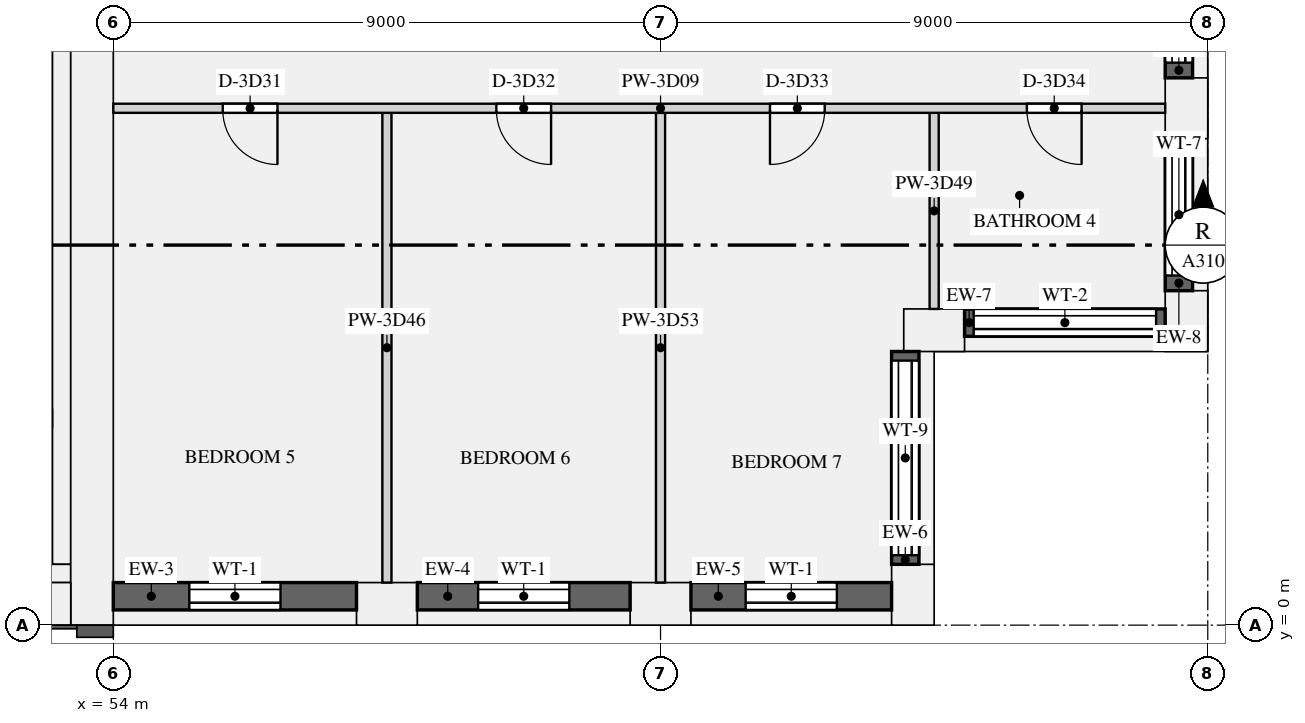
"""IFC4 building model, lengths in metres.
Left out: names, types, materials, properties, quantities, classifications, styles, units other than length and angle.
Written with IfcOpenShell. Run it as: python <this file> out.ifc"""

import sys

from ifc_helpers import new_model, si_unit, direction, frame, frame_2d, origin, origin_2d, place, context, subcontext, project, spatial, rectangle, extrude, element, fill, save


model = new_model("IFC4")
c1 = context("Model", 3, precision=1e-05, world=origin(), true_north=direction((0.0, 1.0)))
c2 = subcontext(c1, "Body", "Model", "MODEL_VIEW")
j1 = project(units=[si_unit("LENGTHUNIT", "METRE"), si_unit("PLANEANGLEUNIT", "RADIAN")], contexts=[c1])
p1 = place(None, origin())
s1 = spatial("IfcSite", under=j1, at=p1, CompositionType="ELEMENT")
p2 = place(p1, origin())
s2 = spatial("IfcBuilding", under=s1, at=p2, CompositionType="ELEMENT")
p3 = place(p2, frame((0.0, 0.0, 166.5)))
s3 = spatial("IfcBuildingStorey", under=s2, at=p3, CompositionType="ELEMENT", Elevation=166.5)
for number, where, z_axis, x_axis in (
    (1, (58.5, 0.35, 0.0), (0.0, 0.0, 1.0), (1.0, 0.0, 0.0)),
    (2, (63.0, 0.35, 0.0), (0.0, 0.0, 1.0), (1.0, 0.0, 0.0)),
    (3, (67.15, 0.5, 0.0), (0.0, 0.0, 1.0), (0.0, 1.0, 0.0)),
    (4, (67.5, 4.85, 0.0), (0.0, 0.0, 1.0), (1.0, 0.0, 0.0)),
    (5, (71.65, 5.0, 0.0), (0.0, 0.0, 1.0), (0.0, 1.0, 0.0)),
    (6, (71.65, 8.5, 0.0), (0.0, 0.0, 1.0), (0.0, 1.0, 0.0)),
):
    element("IfcColumn", number, at=place(p3, frame(where, z_axis=z_axis, x_axis=x_axis)), inside=s3, PredefinedType="USERDEFINED", context=c2, shape_type="SweptSolid", body=[
        extrude(rectangle(XDim=1.0, YDim=0.7, at=origin_2d()), origin(), (0.0, 0.0, 1.0), 3.15),
    ])
p4 = place(p3, frame((53.65, 0.0, 0.0), z_axis=(0.0, 0.0, 1.0), x_axis=(0.0, 1.0, 0.0)))
e7 = element("IfcWall", 7, at=p4, inside=s3, PredefinedType="SHEAR", context=c2, shape_type="SweptSolid", body=[
    extrude(rectangle(XDim=12.5, YDim=0.7, at=frame_2d((6.25, 0.0))), origin(), (0.0, 0.0, 1.0), 3.15),
])
p5 = place(p3, frame((18.7, 0.35, 0.0), z_axis=(0.0, 0.0, 1.0), x_axis=(1.0, 0.0, 0.0)))
e8 = element("IfcWall", 8, at=p5, inside=s3, PredefinedType="SHEAR", context=c2, shape_type="SweptSolid", body=[
    extrude(rectangle(XDim=34.6, YDim=0.7, at=frame_2d((17.3, 0.0))), origin(), (0.0, 0.0, 1.0), 3.15),
])
p6 = place(p3, frame((53.15, 1.0, 0.0), z_axis=(0.0, 0.0, 1.0), x_axis=(0.0, 1.0, 0.0)))
e9 = element("IfcWall", 9, at=p6, inside=s3, PredefinedType="SHEAR", context=c2, shape_type="SweptSolid", body=[
    extrude(rectangle(XDim=10.9, YDim=0.3, at=frame_2d((5.45, 0.0))), origin(), (0.0, 0.0, 1.0), 3.15),
])
p7 = place(p3, frame((18.7, 0.85, 0.0), z_axis=(0.0, 0.0, 1.0), x_axis=(1.0, 0.0, 0.0)))
e10 = element("IfcWall", 10, at=p7, inside=s3, PredefinedType="SHEAR", context=c2, shape_type="SweptSolid", body=[
    extrude(rectangle(XDim=34.6, YDim=0.3, at=frame_2d((17.3, 0.0))), origin(), (0.0, 0.0, 1.0), 3.15),
])
p8 = place(p3, frame((54.0, 0.475, 0.9), z_axis=(0.0, 0.0, 1.0), x_axis=(1.0, 0.0, 0.0)))
e11 = element("IfcWall", 11, at=p8, inside=s3, PredefinedType="SOLIDWALL", context=c2, shape_type="SweptSolid", body=[
    extrude(rectangle(XDim=4.0, YDim=0.45, at=frame_2d((2.0, 0.0))), origin(), (0.0, 0.0, 1.0), 1.93),
])
p9 = place(p8, frame((1.25, 0.0, 0.15)))
e12 = element("IfcOpeningElement", 12, at=p9, cuts=e11, PredefinedType="OPENING", context=c2, shape_type="SweptSolid", body=[
    extrude(rectangle(XDim=1.5, YDim=1.5, at=frame_2d((0.75, 0.75))), frame((0.0, 0.235, 0.0), z_axis=(0.0, -1.0, 0.0), x_axis=(1.0, 0.0, 0.0)), (0.0, 0.0, 1.0), 0.47),
])
p10 = place(p3, frame((59.0, 0.475, 0.9), z_axis=(0.0, 0.0, 1.0), x_axis=(1.0, 0.0, 0.0)))
e13 = element("IfcWall", 13, at=p10, inside=s3, PredefinedType="SOLIDWALL", context=c2, shape_type="SweptSolid", body=[
    extrude(rectangle(XDim=3.5, YDim=0.45, at=frame_2d((1.75, 0.0))), origin(), (0.0, 0.0, 1.0), 1.93),
])
p11 = place(p10, frame((1.0, 0.0, 0.15)))
e14 = element("IfcOpeningElement", 14, at=p11, cuts=e13, PredefinedType="OPENING", context=c2, shape_type="SweptSolid", body=[
    extrude(rectangle(XDim=1.5, YDim=1.5, at=frame_2d((0.75, 0.75))), frame((0.0, 0.235, 0.0), z_axis=(0.0, -1.0, 0.0), x_axis=(1.0, 0.0, 0.0)), (0.0, 0.0, 1.0), 0.47),
])
p12 = place(p3, frame((63.5, 0.475, 0.9), z_axis=(0.0, 0.0, 1.0), x_axis=(1.0, 0.0, 0.0)))
e15 = element("IfcWall", 15, at=p12, inside=s3, PredefinedType="SOLIDWALL", context=c2, shape_type="SweptSolid", body=[
    extrude(rectangle(XDim=3.3, YDim=0.45, at=frame_2d((1.65, 0.0))), origin(), (0.0, 0.0, 1.0), 1.93),
])
p13 = place(p12, frame((0.9, 0.0, 0.15)))
e16 = element("IfcOpeningElement", 16, at=p13, cuts=e15, PredefinedType="OPENING", context=c2, shape_type="SweptSolid", body=[
    extrude(rectangle(XDim=1.5, YDim=1.5, at=frame_2d((0.75, 0.75))), frame((0.0, 0.235, 0.0), z_axis=(0.0, -1.0, 0.0), x_axis=(1.0, 0.0, 0.0)), (0.0, 0.0, 1.0), 0.47),
])
p14 = place(p3, frame((67.025, 1.0, 0.9), z_axis=(0.0, 0.0, 1.0), x_axis=(0.0, 1.0, 0.0)))
e17 = element("IfcWall", 17, at=p14, inside=s3, PredefinedType="SOLIDWALL", context=c2, shape_type="SweptSolid", body=[
    extrude(rectangle(XDim=3.5, YDim=0.45, at=frame_2d((1.75, 0.0))), origin(), (0.0, 0.0, 1.0), 1.93),
])
p15 = place(p14, frame((0.15, 0.0, 0.15)))
e18 = element("IfcOpeningElement", 18, at=p15, cuts=e17, PredefinedType="OPENING", context=c2, shape_type="SweptSolid", body=[
    extrude(rectangle(XDim=3.2, YDim=1.5, at=frame_2d((1.6, 0.75))), frame((0.0, 0.235, 0.0), z_axis=(0.0, -1.0, 0.0), x_axis=(1.0, 0.0, 0.0)), (0.0, 0.0, 1.0), 0.47),
])
p16 = place(p3, frame((68.0, 4.975, 0.9), z_axis=(0.0, 0.0, 1.0), x_axis=(1.0, 0.0, 0.0)))
e19 = element("IfcWall", 19, at=p16, inside=s3, PredefinedType="SOLIDWALL", context=c2, shape_type="SweptSolid", body=[
    extrude(rectangle(XDim=3.3, YDim=0.45, at=frame_2d((1.65, 0.0))), origin(), (0.0, 0.0, 1.0), 1.93),
])
p17 = place(p16, frame((0.15, 0.0, 0.15)))
e20 = element("IfcOpeningElement", 20, at=p17, cuts=e19, PredefinedType="OPENING", context=c2, shape_type="SweptSolid", body=[
    extrude(rectangle(XDim=3.0, YDim=1.5, at=frame_2d((1.5, 0.75))), frame((0.0, 0.235, 0.0), z_axis=(0.0, -1.0, 0.0), x_axis=(1.0, 0.0, 0.0)), (0.0, 0.0, 1.0), 0.47),
])
p18 = place(p3, frame((71.525, 5.5, 0.9), z_axis=(0.0, 0.0, 1.0), x_axis=(0.0, 1.0, 0.0)))
e21 = element("IfcWall", 21, at=p18, inside=s3, PredefinedType="SOLIDWALL", context=c2, shape_type="SweptSolid", body=[
    extrude(rectangle(XDim=2.5, YDim=0.45, at=frame_2d((1.25, 0.0))), origin(), (0.0, 0.0, 1.0), 1.93),
])
p19 = place(p18, frame((0.25, 0.0, 0.15)))
e22 = element("IfcOpeningElement", 22, at=p19, cuts=e21, PredefinedType="OPENING", context=c2, shape_type="SweptSolid", body=[
    extrude(rectangle(XDim=2.0, YDim=1.5, at=frame_2d((1.0, 0.75))), frame((0.0, 0.235, 0.0), z_axis=(0.0, -1.0, 0.0), x_axis=(1.0, 0.0, 0.0)), (0.0, 0.0, 1.0), 0.47),
])
p20 = place(p3, frame((71.525, 9.0, 0.9), z_axis=(0.0, 0.0, 1.0), x_axis=(0.0, 1.0, 0.0)))
e23 = element("IfcWall", 23, at=p20, inside=s3, PredefinedType="SOLIDWALL", context=c2, shape_type="SweptSolid", body=[
    extrude(rectangle(XDim=3.0, YDim=0.45, at=frame_2d((1.5, 0.0))), origin(), (0.0, 0.0, 1.0), 1.93),
])
p21 = place(p20, frame((0.25, 0.0, 0.15)))
e24 = element("IfcOpeningElement", 24, at=p21, cuts=e23, PredefinedType="OPENING", context=c2, shape_type="SweptSolid", body=[
    extrude(rectangle(XDim=2.5, YDim=1.5, at=frame_2d((1.25, 0.75))), frame((0.0, 0.235, 0.0), z_axis=(0.0, -1.0, 0.0), x_axis=(1.0, 0.0, 0.0)), (0.0, 0.0, 1.0), 0.47),
])
p22 = place(p3, frame((54.0, 8.5, 0.0), z_axis=(0.0, 0.0, 1.0), x_axis=(1.0, 0.0, 0.0)))
e25 = element("IfcWall", 25, at=p22, inside=s3, PredefinedType="PARTITIONING", context=c2, shape_type="SweptSolid", body=[
    extrude(rectangle(XDim=17.3, YDim=0.15, at=frame_2d((8.65, 0.0))), origin(), (0.0, 0.0, 1.0), 2.83),
])
p23 = place(p22, frame((1.8, 0.0, 0.0)))
e26 = element("IfcOpeningElement", 26, at=p23, cuts=e25, PredefinedType="OPENING", context=c2, shape_type="SweptSolid", body=[
    extrude(rectangle(XDim=0.9, YDim=2.1, at=frame_2d((0.45, 1.05))), frame((0.0, 0.085, 0.0), z_axis=(0.0, -1.0, 0.0), x_axis=(1.0, 0.0, 0.0)), (0.0, 0.0, 1.0), 0.17),
])
p24 = place(p22, frame((6.3, 0.0, 0.0)))
e27 = element("IfcOpeningElement", 27, at=p24, cuts=e25, PredefinedType="OPENING", context=c2, shape_type="SweptSolid", body=[
    extrude(rectangle(XDim=0.9, YDim=2.1, at=frame_2d((0.45, 1.05))), frame((0.0, 0.085, 0.0), z_axis=(0.0, -1.0, 0.0), x_axis=(1.0, 0.0, 0.0)), (0.0, 0.0, 1.0), 0.17),
])
p25 = place(p22, frame((10.8, 0.0, 0.0)))
e28 = element("IfcOpeningElement", 28, at=p25, cuts=e25, PredefinedType="OPENING", context=c2, shape_type="SweptSolid", body=[
    extrude(rectangle(XDim=0.9, YDim=2.1, at=frame_2d((0.45, 1.05))), frame((0.0, 0.085, 0.0), z_axis=(0.0, -1.0, 0.0), x_axis=(1.0, 0.0, 0.0)), (0.0, 0.0, 1.0), 0.17),
])
p26 = place(p22, frame((15.025, 0.0, 0.0)))
e29 = element("IfcOpeningElement", 29, at=p26, cuts=e25, PredefinedType="OPENING", context=c2, shape_type="SweptSolid", body=[
    extrude(rectangle(XDim=0.9, YDim=2.1, at=frame_2d((0.45, 1.05))), frame((0.0, 0.085, 0.0), z_axis=(0.0, -1.0, 0.0), x_axis=(1.0, 0.0, 0.0)), (0.0, 0.0, 1.0), 0.17),
])
p27 = place(p3, frame((58.5, 0.7, 0.0), z_axis=(0.0, 0.0, 1.0), x_axis=(0.0, 1.0, 0.0)))
e30 = element("IfcWall", 30, at=p27, inside=s3, PredefinedType="PARTITIONING", context=c2, shape_type="SweptSolid", body=[
    extrude(rectangle(XDim=7.725, YDim=0.15, at=frame_2d((3.863, 0.0))), origin(), (0.0, 0.0, 1.0), 2.83),
])
p28 = place(p3, frame((67.5, 5.2, 0.0), z_axis=(0.0, 0.0, 1.0), x_axis=(0.0, 1.0, 0.0)))
e31 = element("IfcWall", 31, at=p28, inside=s3, PredefinedType="PARTITIONING", context=c2, shape_type="SweptSolid", body=[
    extrude(rectangle(XDim=3.225, YDim=0.15, at=frame_2d((1.613, 0.0))), origin(), (0.0, 0.0, 1.0), 2.83),
])
p29 = place(p3, frame((63.0, 0.7, 0.0), z_axis=(0.0, 0.0, 1.0), x_axis=(0.0, 1.0, 0.0)))
e32 = element("IfcWall", 32, at=p29, inside=s3, PredefinedType="PARTITIONING", context=c2, shape_type="SweptSolid", body=[
    extrude(rectangle(XDim=7.725, YDim=0.15, at=frame_2d((3.863, 0.0))), origin(), (0.0, 0.0, 1.0), 2.83),
])
p30 = place(p9, origin())
e33 = element("IfcWindow", 33, at=p30, inside=s3, PartitioningType="SINGLE_PANEL", PredefinedType="WINDOW", context=c2, shape_type="SweptSolid", body=[
    extrude(rectangle(XDim=1.5, YDim=1.5, at=frame_2d((0.75, 0.75))), frame((0.0, -0.065, 0.0), z_axis=(0.0, -1.0, 0.0), x_axis=(1.0, 0.0, 0.0)), (0.0, 0.0, 1.0), 0.06),
])
fill(e12, e33)
p31 = place(p11, origin())
e34 = element("IfcWindow", 34, at=p31, inside=s3, PartitioningType="SINGLE_PANEL", PredefinedType="WINDOW", context=c2, shape_type="SweptSolid", body=[
    extrude(rectangle(XDim=1.5, YDim=1.5, at=frame_2d((0.75, 0.75))), frame((0.0, -0.065, 0.0), z_axis=(0.0, -1.0, 0.0), x_axis=(1.0, 0.0, 0.0)), (0.0, 0.0, 1.0), 0.06),
])
fill(e14, e34)
p32 = place(p13, origin())
e35 = element("IfcWindow", 35, at=p32, inside=s3, PartitioningType="SINGLE_PANEL", PredefinedType="WINDOW", context=c2, shape_type="SweptSolid", body=[
    extrude(rectangle(XDim=1.5, YDim=1.5, at=frame_2d((0.75, 0.75))), frame((0.0, -0.065, 0.0), z_axis=(0.0, -1.0, 0.0), x_axis=(1.0, 0.0, 0.0)), (0.0, 0.0, 1.0), 0.06),
])
fill(e16, e35)
p33 = place(p15, origin())
e36 = element("IfcWindow", 36, at=p33, inside=s3, PartitioningType="SINGLE_PANEL", PredefinedType="WINDOW", context=c2, shape_type="SweptSolid", body=[
    extrude(rectangle(XDim=3.2, YDim=1.5, at=frame_2d((1.6, 0.75))), frame((0.0, -0.065, 0.0), z_axis=(0.0, -1.0, 0.0), x_axis=(1.0, 0.0, 0.0)), (0.0, 0.0, 1.0), 0.06),
])
fill(e18, e36)
p34 = place(p17, origin())
e37 = element("IfcWindow", 37, at=p34, inside=s3, PartitioningType="SINGLE_PANEL", PredefinedType="WINDOW", context=c2, shape_type="SweptSolid", body=[
    extrude(rectangle(XDim=3.0, YDim=1.5, at=frame_2d((1.5, 0.75))), frame((0.0, -0.065, 0.0), z_axis=(0.0, -1.0, 0.0), x_axis=(1.0, 0.0, 0.0)), (0.0, 0.0, 1.0), 0.06),
])
fill(e20, e37)
p35 = place(p19, origin())
e38 = element("IfcWindow", 38, at=p35, inside=s3, PartitioningType="SINGLE_PANEL", PredefinedType="WINDOW", context=c2, shape_type="SweptSolid", body=[
    extrude(rectangle(XDim=2.0, YDim=1.5, at=frame_2d((1.0, 0.75))), frame((0.0, -0.065, 0.0), z_axis=(0.0, -1.0, 0.0), x_axis=(1.0, 0.0, 0.0)), (0.0, 0.0, 1.0), 0.06),
])
fill(e22, e38)
p36 = place(p21, origin())
e39 = element("IfcWindow", 39, at=p36, inside=s3, PartitioningType="SINGLE_PANEL", PredefinedType="WINDOW", context=c2, shape_type="SweptSolid", body=[
    extrude(rectangle(XDim=2.5, YDim=1.5, at=frame_2d((1.25, 0.75))), frame((0.0, -0.065, 0.0), z_axis=(0.0, -1.0, 0.0), x_axis=(1.0, 0.0, 0.0)), (0.0, 0.0, 1.0), 0.06),
])
fill(e24, e39)
p37 = place(p23, frame((0.9, 0.0, 0.0), z_axis=(0.0, 0.0, 1.0), x_axis=(-1.0, 0.0, 0.0)))
e40 = element("IfcDoor", 40, at=p37, inside=s3, OperationType="SINGLE_SWING_LEFT", PredefinedType="DOOR", context=c2, shape_type="SweptSolid", body=[
    extrude(rectangle(XDim=0.9, YDim=2.1, at=frame_2d((0.45, 1.05))), frame((0.0, 0.025, 0.0), z_axis=(0.0, -1.0, 0.0), x_axis=(1.0, 0.0, 0.0)), (0.0, 0.0, 1.0), 0.05),
])
fill(e26, e40)
p38 = place(p24, frame((0.9, 0.0, 0.0), z_axis=(0.0, 0.0, 1.0), x_axis=(-1.0, 0.0, 0.0)))
e41 = element("IfcDoor", 41, at=p38, inside=s3, OperationType="SINGLE_SWING_LEFT", PredefinedType="DOOR", context=c2, shape_type="SweptSolid", body=[
    extrude(rectangle(XDim=0.9, YDim=2.1, at=frame_2d((0.45, 1.05))), frame((0.0, 0.025, 0.0), z_axis=(0.0, -1.0, 0.0), x_axis=(1.0, 0.0, 0.0)), (0.0, 0.0, 1.0), 0.05),
])
fill(e27, e41)
p39 = place(p25, frame((0.9, 0.0, 0.0), z_axis=(0.0, 0.0, 1.0), x_axis=(-1.0, 0.0, 0.0)))
e42 = element("IfcDoor", 42, at=p39, inside=s3, OperationType="SINGLE_SWING_RIGHT", PredefinedType="DOOR", context=c2, shape_type="SweptSolid", body=[
    extrude(rectangle(XDim=0.9, YDim=2.1, at=frame_2d((0.45, 1.05))), frame((0.0, 0.025, 0.0), z_axis=(0.0, -1.0, 0.0), x_axis=(1.0, 0.0, 0.0)), (0.0, 0.0, 1.0), 0.05),
])
fill(e28, e42)
p40 = place(p26, frame((0.9, 0.0, 0.0), z_axis=(0.0, 0.0, 1.0), x_axis=(-1.0, 0.0, 0.0)))
e43 = element("IfcDoor", 43, at=p40, inside=s3, OperationType="SINGLE_SWING_LEFT", PredefinedType="DOOR", context=c2, shape_type="SweptSolid", body=[
    extrude(rectangle(XDim=0.9, YDim=2.1, at=frame_2d((0.45, 1.05))), frame((0.0, 0.025, 0.0), z_axis=(0.0, -1.0, 0.0), x_axis=(1.0, 0.0, 0.0)), (0.0, 0.0, 1.0), 0.05),
])
fill(e29, e43)
save(model, sys.argv[1])
